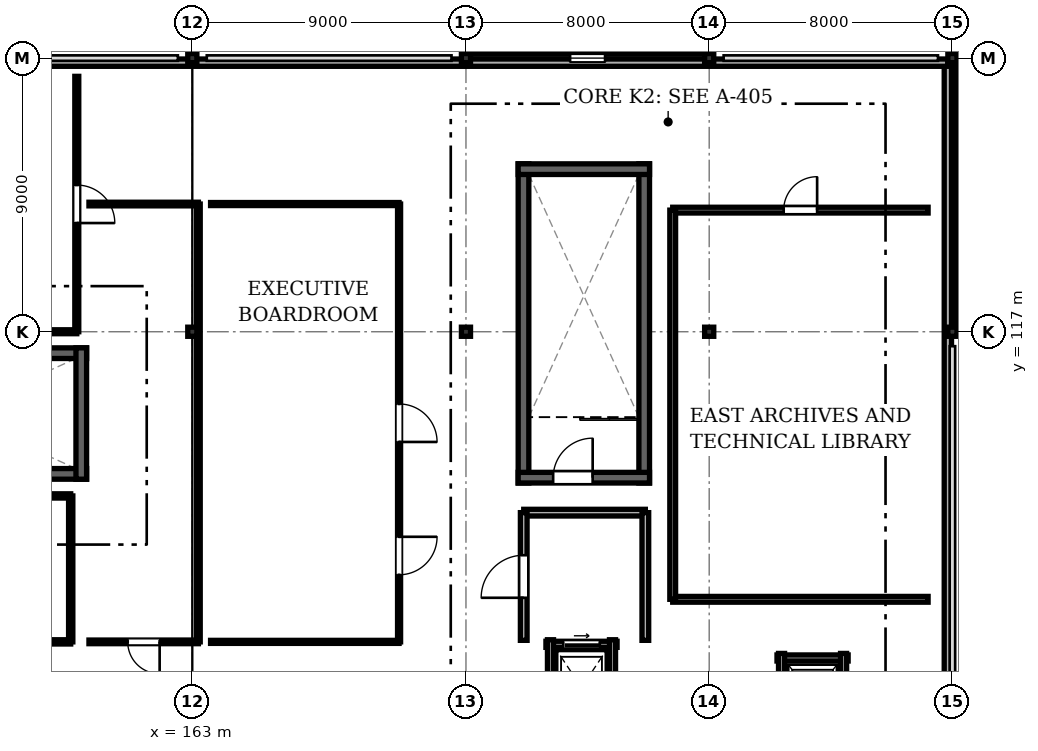
"""IFC4 building model, lengths in metres.
Left out: names, types, materials, properties, quantities, classifications, styles, units other than length and angle.
Written with IfcOpenShell. Run it as: python <this file> out.ifc"""

import sys

from ifc_helpers import new_model, si_unit, direction, frame, frame_2d, origin, origin_2d, place, context, subcontext, project, spatial, rectangle, i_section, extrude, element, fill, save


model = new_model("IFC4")
c1 = context("Model", 3, precision=1e-05, world=origin(), true_north=direction((0.0, 1.0)))
c2 = subcontext(c1, "Body", "Model", "MODEL_VIEW")
j1 = project(units=[si_unit("LENGTHUNIT", "METRE"), si_unit("PLANEANGLEUNIT", "RADIAN")], contexts=[c1])
p1 = place(None, origin())
s1 = spatial("IfcSite", under=j1, at=p1, CompositionType="ELEMENT")
p2 = place(p1, origin())
s2 = spatial("IfcBuilding", under=s1, at=p2, CompositionType="ELEMENT")
p3 = place(p2, frame((0.0, 0.0, 20.8)))
s3 = spatial("IfcBuildingStorey", under=s2, at=p3, CompositionType="ELEMENT", Elevation=20.8)
for number, where, z_axis, x_axis in (
    (1, (163.0, 117.0, 0.0), (0.0, 0.0, 1.0), (1.0, 0.0, 0.0)),
    (2, (163.0, 126.0, 0.0), (0.0, 0.0, 1.0), (1.0, 0.0, 0.0)),
    (3, (172.0, 117.0, 0.0), (0.0, 0.0, 1.0), (1.0, 0.0, 0.0)),
    (4, (172.0, 126.0, 0.0), (0.0, 0.0, 1.0), (1.0, 0.0, 0.0)),
    (5, (180.0, 117.0, 0.0), (0.0, 0.0, 1.0), (1.0, 0.0, 0.0)),
    (6, (180.0, 126.0, 0.0), (0.0, 0.0, 1.0), (1.0, 0.0, 0.0)),
    (7, (188.0, 117.0, 0.0), (0.0, 0.0, 1.0), (1.0, 0.0, 0.0)),
    (8, (188.0, 126.0, 0.0), (0.0, 0.0, 1.0), (1.0, 0.0, 0.0)),
):
    element("IfcColumn", number, at=place(p3, frame(where, z_axis=z_axis, x_axis=x_axis)), inside=s3, PredefinedType="COLUMN", context=c2, shape_type="SweptSolid", body=[
        extrude(i_section(OverallWidth=0.3, OverallDepth=0.3, WebThickness=0.01, FlangeThickness=0.015, FilletRadius=0.018, at=origin_2d()), origin(), (0.0, 0.0, 1.0), 2.85),
    ])
p4 = place(p3, frame((172.005, 126.0, 0.0), z_axis=(0.0, 0.0, 1.0), x_axis=(1.0, 0.0, 0.0)))
e9 = element("IfcWall", 9, at=p4, inside=s3, PredefinedType="SOLIDWALL", context=c2, shape_type="SweptSolid", body=[
    extrude(rectangle(XDim=7.99, YDim=0.26, at=frame_2d((3.995, 0.0))), origin(), (0.0, 0.0, 1.0), 2.23),
])
p5 = place(p4, frame((3.42, 0.0, 0.7)))
e10 = element("IfcOpeningElement", 10, at=p5, cuts=e9, PredefinedType="OPENING", context=c2, shape_type="SweptSolid", body=[
    extrude(rectangle(XDim=1.15, YDim=1.45, at=frame_2d((0.575, 0.725))), frame((0.0, 0.14, 0.0), z_axis=(0.0, -1.0, 0.0), x_axis=(1.0, 0.0, 0.0)), (0.0, 0.0, 1.0), 0.28),
])
p6 = place(p3, frame((188.0, 125.85, 0.0), z_axis=(0.0, 0.0, 1.0), x_axis=(0.0, -1.0, 0.0)))
e11 = element("IfcWall", 11, at=p6, inside=s3, PredefinedType="SOLIDWALL", context=c2, shape_type="SweptSolid", body=[
    extrude(rectangle(XDim=8.7, YDim=0.245, at=frame_2d((4.35, 0.0))), origin(), (0.0, 0.0, 1.0), 2.18),
])
p7 = place(p3, frame((187.85, 76.65, 2.85), z_axis=(0.0, 0.0, 1.0), x_axis=(0.0, 1.0, 0.0)))
e12 = element("IfcWall", 12, at=p7, inside=s3, PredefinedType="PARAPET", context=c2, shape_type="SweptSolid", body=[
    extrude(rectangle(XDim=49.2, YDim=0.24, at=frame_2d((24.6, 0.0))), origin(), (0.0, 0.0, 1.0), 0.34),
])
p8 = place(p3, frame((187.85, 125.85, 2.85), z_axis=(0.0, 0.0, 1.0), x_axis=(-1.0, 0.0, 0.0)))
e13 = element("IfcWall", 13, at=p8, inside=s3, PredefinedType="PARAPET", context=c2, shape_type="SweptSolid", body=[
    extrude(rectangle(XDim=51.7, YDim=0.24, at=frame_2d((25.85, 0.0))), origin(), (0.0, 0.0, 1.0), 0.34),
])
for number, where, z_axis, x_axis in (
    (14, (177.863, 112.025, 0.0), (0.0, 0.0, 1.0), (0.0, 1.0, 0.0)),
    (15, (173.893, 122.522, 0.0), (0.0, 0.0, 1.0), (0.0, -1.0, 0.0)),
):
    element("IfcWall", number, at=place(p3, frame(where, z_axis=z_axis, x_axis=x_axis)), inside=s3, PredefinedType="SHEAR", context=c2, shape_type="SweptSolid", body=[
        extrude(rectangle(XDim=10.498, YDim=0.35, at=frame_2d((5.249, 0.0))), origin(), (0.0, 0.0, 1.0), 2.645),
    ])
p9 = place(p3, frame((178.038, 122.347, 0.0), z_axis=(0.0, 0.0, 1.0), x_axis=(-1.0, 0.0, 0.0)))
e16 = element("IfcWall", 16, at=p9, inside=s3, PredefinedType="SHEAR", context=c2, shape_type="SweptSolid", body=[
    extrude(rectangle(XDim=4.32, YDim=0.35, at=frame_2d((2.16, 0.0))), origin(), (0.0, 0.0, 1.0), 2.645),
])
p10 = place(p3, frame((173.718, 112.2, 0.0), z_axis=(0.0, 0.0, 1.0), x_axis=(1.0, 0.0, 0.0)))
e17 = element("IfcWall", 17, at=p10, inside=s3, PredefinedType="SHEAR", context=c2, shape_type="SweptSolid", body=[
    extrude(rectangle(XDim=4.32, YDim=0.35, at=frame_2d((2.16, 0.0))), origin(), (0.0, 0.0, 1.0), 2.645),
])
p11 = place(p10, frame((1.15, 0.0, 0.0)))
e18 = element("IfcOpeningElement", 18, at=p11, cuts=e17, PredefinedType="OPENING", context=c2, shape_type="SweptSolid", body=[
    extrude(rectangle(XDim=1.3, YDim=2.1, at=frame_2d((0.65, 1.05))), frame((0.0, 0.185, 0.0), z_axis=(0.0, -1.0, 0.0), x_axis=(1.0, 0.0, 0.0)), (0.0, 0.0, 1.0), 0.37),
])
p12 = place(p3, frame((149.025, 112.325, 0.0), z_axis=(0.0, 0.0, 1.0), x_axis=(1.0, 0.0, 0.0)))
e19 = element("IfcWall", 19, at=p12, inside=s3, PredefinedType="SHEAR", context=c2, shape_type="SweptSolid", body=[
    extrude(rectangle(XDim=10.498, YDim=0.35, at=frame_2d((5.249, 0.0))), origin(), (0.0, 0.0, 1.0), 2.645),
])
p13 = place(p12, frame((0.55, 0.0, 0.0)))
e20 = element("IfcOpeningElement", 20, at=p13, cuts=e19, PredefinedType="OPENING", context=c2, shape_type="SweptSolid", body=[
    extrude(rectangle(XDim=1.3, YDim=2.1, at=frame_2d((0.65, 1.05))), frame((0.0, 0.185, 0.0), z_axis=(0.0, -1.0, 0.0), x_axis=(1.0, 0.0, 0.0)), (0.0, 0.0, 1.0), 0.37),
])
p14 = place(p3, frame((159.522, 116.295, 0.0), z_axis=(0.0, 0.0, 1.0), x_axis=(-1.0, 0.0, 0.0)))
e21 = element("IfcWall", 21, at=p14, inside=s3, PredefinedType="SHEAR", context=c2, shape_type="SweptSolid", body=[
    extrude(rectangle(XDim=10.498, YDim=0.35, at=frame_2d((5.249, 0.0))), origin(), (0.0, 0.0, 1.0), 2.645),
])
p15 = place(p3, frame((159.347, 112.15, 0.0), z_axis=(0.0, 0.0, 1.0), x_axis=(0.0, 1.0, 0.0)))
e22 = element("IfcWall", 22, at=p15, inside=s3, PredefinedType="SHEAR", context=c2, shape_type="SweptSolid", body=[
    extrude(rectangle(XDim=4.32, YDim=0.35, at=frame_2d((2.16, 0.0))), origin(), (0.0, 0.0, 1.0), 2.645),
])
p16 = place(p3, frame((176.97, 106.72, 0.0), z_axis=(0.0, 0.0, 1.0), x_axis=(-1.0, 0.0, 0.0)))
e23 = element("IfcWall", 23, at=p16, inside=s3, PredefinedType="SOLIDWALL", context=c2, shape_type="SweptSolid", body=[
    extrude(rectangle(XDim=2.34, YDim=0.2, at=frame_2d((1.17, 0.0))), origin(), (0.0, 0.0, 1.0), 2.62),
])
p17 = place(p16, frame((0.57, 0.0, 0.0)))
e24 = element("IfcOpeningElement", 24, at=p17, cuts=e23, PredefinedType="OPENING", context=c2, shape_type="SweptSolid", body=[
    extrude(rectangle(XDim=1.2, YDim=2.15, at=frame_2d((0.6, 1.075))), frame((0.0, 0.11, 0.0), z_axis=(0.0, -1.0, 0.0), x_axis=(1.0, 0.0, 0.0)), (0.0, 0.0, 1.0), 0.22),
])
for number, where, z_axis, x_axis in (
    (25, (174.78, 106.87, 0.0), (0.0, 0.0, 1.0), (0.0, -1.0, 0.0)),
    (26, (176.82, 103.73, 0.0), (0.0, 0.0, 1.0), (0.0, 1.0, 0.0)),
):
    element("IfcWall", number, at=place(p3, frame(where, z_axis=z_axis, x_axis=x_axis)), inside=s3, PredefinedType="SOLIDWALL", context=c2, shape_type="SweptSolid", body=[
        extrude(rectangle(XDim=3.14, YDim=0.2, at=frame_2d((1.57, 0.0))), origin(), (0.0, 0.0, 1.0), 2.23),
    ])
p18 = place(p3, frame((184.57, 106.27, 0.0), z_axis=(0.0, 0.0, 1.0), x_axis=(-1.0, 0.0, 0.0)))
e27 = element("IfcWall", 27, at=p18, inside=s3, PredefinedType="SOLIDWALL", context=c2, shape_type="SweptSolid", body=[
    extrude(rectangle(XDim=2.34, YDim=0.2, at=frame_2d((1.17, 0.0))), origin(), (0.0, 0.0, 1.0), 2.62),
])
for number, where, z_axis, x_axis in (
    (28, (182.38, 106.42, 0.0), (0.0, 0.0, 1.0), (0.0, -1.0, 0.0)),
    (29, (184.42, 103.58, 0.0), (0.0, 0.0, 1.0), (0.0, 1.0, 0.0)),
):
    element("IfcWall", number, at=place(p3, frame(where, z_axis=z_axis, x_axis=x_axis)), inside=s3, PredefinedType="SOLIDWALL", context=c2, shape_type="SweptSolid", body=[
        extrude(rectangle(XDim=2.84, YDim=0.2, at=frame_2d((1.42, 0.0))), origin(), (0.0, 0.0, 1.0), 2.23),
    ])
p19 = place(p3, frame((159.0, 106.8, 0.0), z_axis=(0.0, 0.0, 1.0), x_axis=(-1.0, 0.0, 0.0)))
e30 = element("IfcWall", 30, at=p19, inside=s3, PredefinedType="PARTITIONING", context=c2, shape_type="SweptSolid", body=[
    extrude(rectangle(XDim=8.2, YDim=0.14, at=frame_2d((4.1, 0.0))), origin(), (0.0, 0.0, 1.0), 2.18),
])
p20 = place(p19, frame((3.475, 0.0, 0.0)))
e31 = element("IfcOpeningElement", 31, at=p20, cuts=e30, PredefinedType="OPENING", context=c2, shape_type="SweptSolid", body=[
    extrude(rectangle(XDim=1.25, YDim=2.1, at=frame_2d((0.625, 1.05))), frame((0.0, 0.08, 0.0), z_axis=(0.0, -1.0, 0.0), x_axis=(1.0, 0.0, 0.0)), (0.0, 0.0, 1.0), 0.16),
])
p21 = place(p3, frame((150.8, 111.6, 0.0), z_axis=(0.0, 0.0, 1.0), x_axis=(1.0, 0.0, 0.0)))
e32 = element("IfcWall", 32, at=p21, inside=s3, PredefinedType="PARTITIONING", context=c2, shape_type="SweptSolid", body=[
    extrude(rectangle(XDim=8.2, YDim=0.14, at=frame_2d((4.1, 0.0))), origin(), (0.0, 0.0, 1.0), 2.18),
])
p22 = place(p3, frame((159.0, 111.6, 0.0), z_axis=(0.0, 0.0, 1.0), x_axis=(0.0, -1.0, 0.0)))
e33 = element("IfcWall", 33, at=p22, inside=s3, PredefinedType="PARTITIONING", context=c2, shape_type="SweptSolid", body=[
    extrude(rectangle(XDim=4.8, YDim=0.14, at=frame_2d((2.4, 0.0))), origin(), (0.0, 0.0, 1.0), 2.22),
])
p23 = place(p3, frame((159.2, 117.0, 0.0), z_axis=(0.0, 0.0, 1.0), x_axis=(-1.0, 0.0, 0.0)))
e34 = element("IfcWall", 34, at=p23, inside=s3, PredefinedType="PARTITIONING", context=c2, shape_type="SweptSolid", body=[
    extrude(rectangle(XDim=12.4, YDim=0.13, at=frame_2d((6.2, 0.0))), origin(), (0.0, 0.0, 1.0), 2.18),
])
p24 = place(p3, frame((159.2, 125.4, 0.0), z_axis=(0.0, 0.0, 1.0), x_axis=(0.0, -1.0, 0.0)))
e35 = element("IfcWall", 35, at=p24, inside=s3, PredefinedType="PARTITIONING", context=c2, shape_type="SweptSolid", body=[
    extrude(rectangle(XDim=8.4, YDim=0.13, at=frame_2d((4.2, 0.0))), origin(), (0.0, 0.0, 1.0), 2.22),
])
p25 = place(p24, frame((3.575, 0.0, 0.0)))
e36 = element("IfcOpeningElement", 36, at=p25, cuts=e35, PredefinedType="OPENING", context=c2, shape_type="SweptSolid", body=[
    extrude(rectangle(XDim=1.25, YDim=2.1, at=frame_2d((0.625, 1.05))), frame((0.0, 0.075, 0.0), z_axis=(0.0, -1.0, 0.0), x_axis=(1.0, 0.0, 0.0)), (0.0, 0.0, 1.0), 0.15),
])
p26 = place(p3, frame((163.2, 106.8, 0.0), z_axis=(0.0, 0.0, 1.0), x_axis=(-1.0, 0.0, 0.0)))
e37 = element("IfcWall", 37, at=p26, inside=s3, PredefinedType="PARTITIONING", context=c2, shape_type="SweptSolid", body=[
    extrude(rectangle(XDim=3.6, YDim=0.12, at=frame_2d((1.8, 0.0))), origin(), (0.0, 0.0, 1.0), 2.18),
])
p27 = place(p26, frame((1.275, 0.0, 0.0)))
e38 = element("IfcOpeningElement", 38, at=p27, cuts=e37, PredefinedType="OPENING", context=c2, shape_type="SweptSolid", body=[
    extrude(rectangle(XDim=1.05, YDim=2.1, at=frame_2d((0.525, 1.05))), frame((0.0, 0.07, 0.0), z_axis=(0.0, -1.0, 0.0), x_axis=(1.0, 0.0, 0.0)), (0.0, 0.0, 1.0), 0.14),
])
p28 = place(p3, frame((159.6, 121.2, 0.0), z_axis=(0.0, 0.0, 1.0), x_axis=(1.0, 0.0, 0.0)))
e39 = element("IfcWall", 39, at=p28, inside=s3, PredefinedType="PARTITIONING", context=c2, shape_type="SweptSolid", body=[
    extrude(rectangle(XDim=3.6, YDim=0.12, at=frame_2d((1.8, 0.0))), origin(), (0.0, 0.0, 1.0), 2.23),
])
p29 = place(p3, frame((163.2, 121.2, 0.0), z_axis=(0.0, 0.0, 1.0), x_axis=(0.0, -1.0, 0.0)))
e40 = element("IfcWall", 40, at=p29, inside=s3, PredefinedType="PARTITIONING", context=c2, shape_type="SweptSolid", body=[
    extrude(rectangle(XDim=14.4, YDim=0.12, at=frame_2d((7.2, 0.0))), origin(), (0.0, 0.0, 1.0), 2.18),
])
p30 = place(p3, frame((169.8, 106.8, 0.0), z_axis=(0.0, 0.0, 1.0), x_axis=(-1.0, 0.0, 0.0)))
e41 = element("IfcWall", 41, at=p30, inside=s3, PredefinedType="PARTITIONING", context=c2, shape_type="SweptSolid", body=[
    extrude(rectangle(XDim=6.2, YDim=0.1, at=frame_2d((3.1, 0.0))), origin(), (0.0, 0.0, 1.0), 2.18),
])
p31 = place(p3, frame((163.6, 121.2, 0.0), z_axis=(0.0, 0.0, 1.0), x_axis=(1.0, 0.0, 0.0)))
e42 = element("IfcWall", 42, at=p31, inside=s3, PredefinedType="PARTITIONING", context=c2, shape_type="SweptSolid", body=[
    extrude(rectangle(XDim=6.2, YDim=0.1, at=frame_2d((3.1, 0.0))), origin(), (0.0, 0.0, 1.0), 2.23),
])
p32 = place(p3, frame((169.8, 121.2, 0.0), z_axis=(0.0, 0.0, 1.0), x_axis=(0.0, -1.0, 0.0)))
e43 = element("IfcWall", 43, at=p32, inside=s3, PredefinedType="PARTITIONING", context=c2, shape_type="SweptSolid", body=[
    extrude(rectangle(XDim=14.4, YDim=0.1, at=frame_2d((7.2, 0.0))), origin(), (0.0, 0.0, 1.0), 2.23),
])
p33 = place(p32, frame((6.575, 0.0, 0.0)))
e44 = element("IfcOpeningElement", 44, at=p33, cuts=e43, PredefinedType="OPENING", context=c2, shape_type="SweptSolid", body=[
    extrude(rectangle(XDim=1.25, YDim=2.1, at=frame_2d((0.625, 1.05))), frame((0.0, 0.06, 0.0), z_axis=(0.0, -1.0, 0.0), x_axis=(1.0, 0.0, 0.0)), (0.0, 0.0, 1.0), 0.12),
])
p34 = place(p32, frame((10.944, 0.0, 0.0)))
e45 = element("IfcOpeningElement", 45, at=p34, cuts=e43, PredefinedType="OPENING", context=c2, shape_type="SweptSolid", body=[
    extrude(rectangle(XDim=1.25, YDim=2.1, at=frame_2d((0.625, 1.05))), frame((0.0, 0.06, 0.0), z_axis=(0.0, -1.0, 0.0), x_axis=(1.0, 0.0, 0.0)), (0.0, 0.0, 1.0), 0.12),
])
p35 = place(p3, frame((187.2, 108.2, 0.0), z_axis=(0.0, 0.0, 1.0), x_axis=(-1.0, 0.0, 0.0)))
e46 = element("IfcWall", 46, at=p35, inside=s3, PredefinedType="PARTITIONING", context=c2, shape_type="SweptSolid", body=[
    extrude(rectangle(XDim=8.4, YDim=0.19, at=frame_2d((4.2, 0.0))), origin(), (0.0, 0.0, 1.0), 2.18),
])
p36 = place(p3, frame((178.8, 121.0, 0.0), z_axis=(0.0, 0.0, 1.0), x_axis=(1.0, 0.0, 0.0)))
e47 = element("IfcWall", 47, at=p36, inside=s3, PredefinedType="PARTITIONING", context=c2, shape_type="SweptSolid", body=[
    extrude(rectangle(XDim=8.4, YDim=0.19, at=frame_2d((4.2, 0.0))), origin(), (0.0, 0.0, 1.0), 2.23),
])
p37 = place(p36, frame((3.65, 0.0, 0.0)))
e48 = element("IfcOpeningElement", 48, at=p37, cuts=e47, PredefinedType="OPENING", context=c2, shape_type="SweptSolid", body=[
    extrude(rectangle(XDim=1.1, YDim=2.1, at=frame_2d((0.55, 1.05))), frame((0.0, 0.105, 0.0), z_axis=(0.0, -1.0, 0.0), x_axis=(1.0, 0.0, 0.0)), (0.0, 0.0, 1.0), 0.21),
])
p38 = place(p3, frame((178.8, 108.2, 0.0), z_axis=(0.0, 0.0, 1.0), x_axis=(0.0, 1.0, 0.0)))
e49 = element("IfcWall", 49, at=p38, inside=s3, PredefinedType="PARTITIONING", context=c2, shape_type="SweptSolid", body=[
    extrude(rectangle(XDim=12.8, YDim=0.19, at=frame_2d((6.4, 0.0))), origin(), (0.0, 0.0, 1.0), 2.23),
])
p39 = place(p3, frame((173.9, 111.05, 0.0), z_axis=(0.0, 0.0, 1.0), x_axis=(1.0, 0.0, 0.0)))
e50 = element("IfcWall", 50, at=p39, inside=s3, PredefinedType="SOLIDWALL", context=c2, shape_type="SweptSolid", body=[
    extrude(rectangle(XDim=4.0, YDim=0.22, at=frame_2d((2.0, 0.0))), origin(), (0.0, 0.0, 1.0), 2.62),
])
p40 = place(p3, frame((173.9, 106.85, 0.0), z_axis=(0.0, 0.0, 1.0), x_axis=(0.0, 1.0, 0.0)))
e51 = element("IfcWall", 51, at=p40, inside=s3, PredefinedType="SOLIDWALL", context=c2, shape_type="SweptSolid", body=[
    extrude(rectangle(XDim=4.2, YDim=0.22, at=frame_2d((2.1, 0.0))), origin(), (0.0, 0.0, 1.0), 2.62),
])
p41 = place(p40, frame((1.4, 0.0, 0.0)))
e52 = element("IfcOpeningElement", 52, at=p41, cuts=e51, PredefinedType="OPENING", context=c2, shape_type="SweptSolid", body=[
    extrude(rectangle(XDim=1.4, YDim=2.1, at=frame_2d((0.7, 1.05))), frame((0.0, 0.12, 0.0), z_axis=(0.0, -1.0, 0.0), x_axis=(1.0, 0.0, 0.0)), (0.0, 0.0, 1.0), 0.24),
])
p42 = place(p3, frame((177.9, 111.05, 0.0), z_axis=(0.0, 0.0, 1.0), x_axis=(0.0, -1.0, 0.0)))
e53 = element("IfcWall", 53, at=p42, inside=s3, PredefinedType="SOLIDWALL", context=c2, shape_type="SweptSolid", body=[
    extrude(rectangle(XDim=4.2, YDim=0.22, at=frame_2d((2.1, 0.0))), origin(), (0.0, 0.0, 1.0), 2.62),
])
p43 = place(p5, origin())
e54 = element("IfcWindow", 54, at=p43, inside=s3, PartitioningType="SINGLE_PANEL", PredefinedType="WINDOW", context=c2, shape_type="SweptSolid", body=[
    extrude(rectangle(XDim=1.15, YDim=1.45, at=frame_2d((0.575, 0.725))), frame((0.0, 0.03, 0.0), z_axis=(0.0, -1.0, 0.0), x_axis=(1.0, 0.0, 0.0)), (0.0, 0.0, 1.0), 0.06),
])
fill(e10, e54)
p44 = place(p11, origin())
e55 = element("IfcDoor", 55, at=p44, inside=s3, OperationType="SINGLE_SWING_RIGHT", PredefinedType="DOOR", context=c2, shape_type="SweptSolid", body=[
    extrude(rectangle(XDim=1.3, YDim=2.1, at=frame_2d((0.65, 1.05))), frame((0.0, 0.025, 0.0), z_axis=(0.0, -1.0, 0.0), x_axis=(1.0, 0.0, 0.0)), (0.0, 0.0, 1.0), 0.05),
])
fill(e18, e55)
p45 = place(p17, origin())
e56 = element("IfcDoor", 56, at=p45, inside=s3, OperationType="SLIDING_TO_LEFT", PredefinedType="DOOR", context=c2, shape_type="SweptSolid", body=[
    extrude(rectangle(XDim=1.2, YDim=2.15, at=frame_2d((0.6, 1.075))), frame((0.0, 0.025, 0.0), z_axis=(0.0, -1.0, 0.0), x_axis=(1.0, 0.0, 0.0)), (0.0, 0.0, 1.0), 0.05),
])
fill(e24, e56)
p46 = place(p25, origin())
e57 = element("IfcDoor", 57, at=p46, inside=s3, OperationType="SINGLE_SWING_RIGHT", PredefinedType="DOOR", context=c2, shape_type="SweptSolid", body=[
    extrude(rectangle(XDim=1.25, YDim=2.1, at=frame_2d((0.625, 1.05))), frame((0.0, 0.025, 0.0), z_axis=(0.0, -1.0, 0.0), x_axis=(1.0, 0.0, 0.0)), (0.0, 0.0, 1.0), 0.05),
])
fill(e36, e57)
p47 = place(p27, origin())
e58 = element("IfcDoor", 58, at=p47, inside=s3, OperationType="SINGLE_SWING_LEFT", PredefinedType="DOOR", context=c2, shape_type="SweptSolid", body=[
    extrude(rectangle(XDim=1.05, YDim=2.1, at=frame_2d((0.525, 1.05))), frame((0.0, 0.025, 0.0), z_axis=(0.0, -1.0, 0.0), x_axis=(1.0, 0.0, 0.0)), (0.0, 0.0, 1.0), 0.05),
])
fill(e38, e58)
p48 = place(p33, origin())
e59 = element("IfcDoor", 59, at=p48, inside=s3, OperationType="SINGLE_SWING_RIGHT", PredefinedType="DOOR", context=c2, shape_type="SweptSolid", body=[
    extrude(rectangle(XDim=1.25, YDim=2.1, at=frame_2d((0.625, 1.05))), frame((0.0, 0.025, 0.0), z_axis=(0.0, -1.0, 0.0), x_axis=(1.0, 0.0, 0.0)), (0.0, 0.0, 1.0), 0.05),
])
fill(e44, e59)
p49 = place(p34, origin())
e60 = element("IfcDoor", 60, at=p49, inside=s3, OperationType="SINGLE_SWING_LEFT", PredefinedType="DOOR", context=c2, shape_type="SweptSolid", body=[
    extrude(rectangle(XDim=1.25, YDim=2.1, at=frame_2d((0.625, 1.05))), frame((0.0, 0.025, 0.0), z_axis=(0.0, -1.0, 0.0), x_axis=(1.0, 0.0, 0.0)), (0.0, 0.0, 1.0), 0.05),
])
fill(e45, e60)
p50 = place(p37, origin())
e61 = element("IfcDoor", 61, at=p50, inside=s3, OperationType="SINGLE_SWING_RIGHT", PredefinedType="DOOR", context=c2, shape_type="SweptSolid", body=[
    extrude(rectangle(XDim=1.1, YDim=2.1, at=frame_2d((0.55, 1.05))), frame((0.0, 0.025, 0.0), z_axis=(0.0, -1.0, 0.0), x_axis=(1.0, 0.0, 0.0)), (0.0, 0.0, 1.0), 0.05),
])
fill(e48, e61)
p51 = place(p41, origin())
e62 = element("IfcDoor", 62, at=p51, inside=s3, OperationType="SINGLE_SWING_LEFT", PredefinedType="DOOR", context=c2, shape_type="SweptSolid", body=[
    extrude(rectangle(XDim=1.4, YDim=2.1, at=frame_2d((0.7, 1.05))), frame((0.0, 0.025, 0.0), z_axis=(0.0, -1.0, 0.0), x_axis=(1.0, 0.0, 0.0)), (0.0, 0.0, 1.0), 0.05),
])
fill(e52, e62)
save(model, sys.argv[1])
